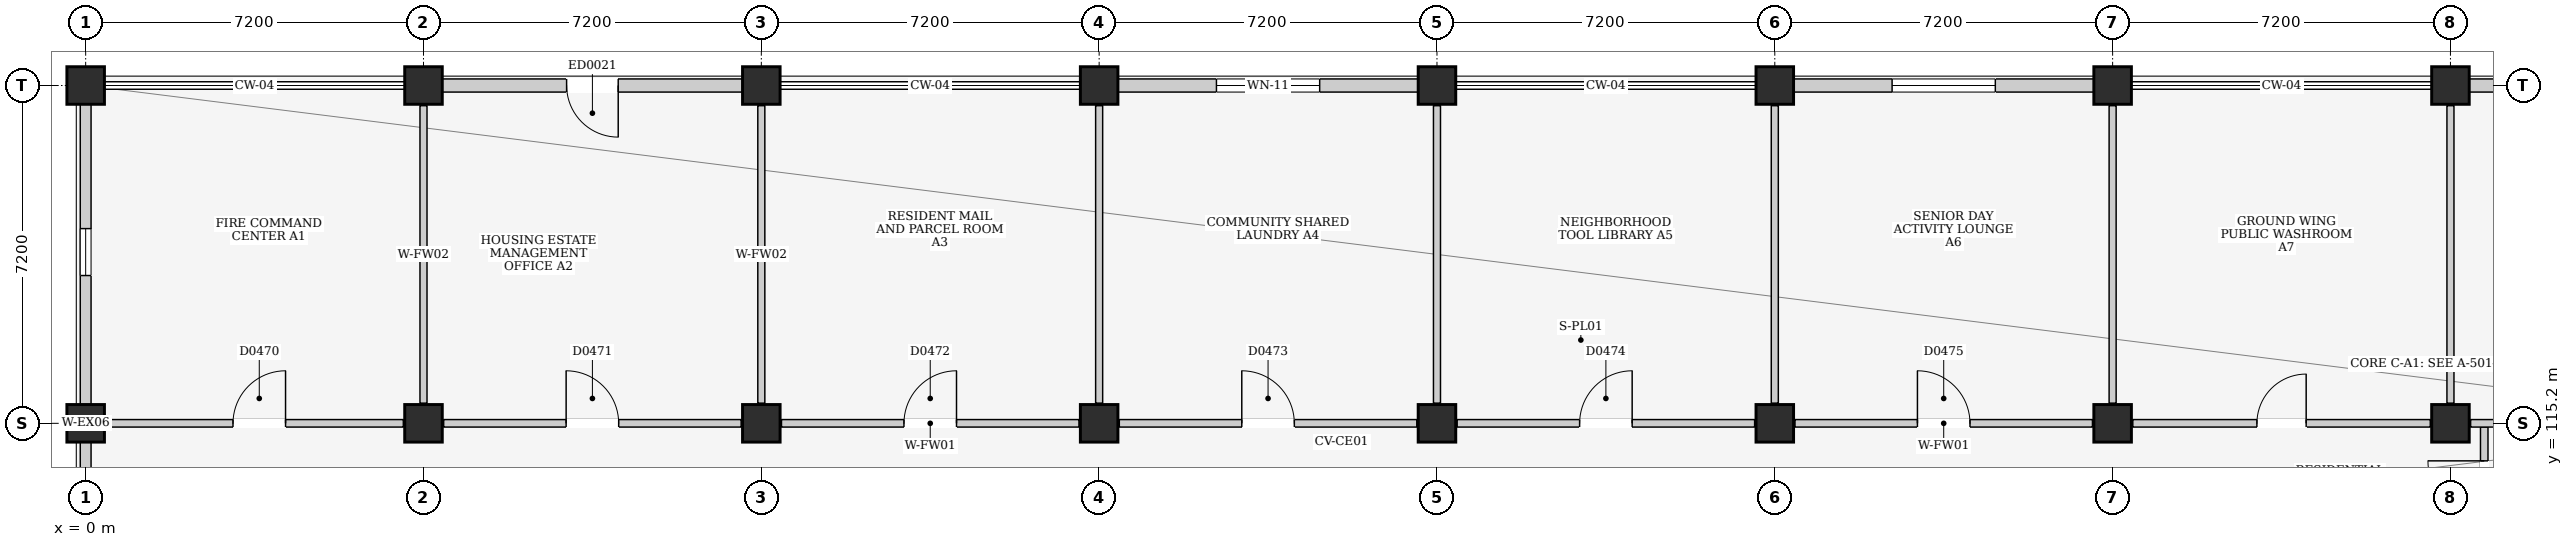
"""IFC4 building model, lengths in metres.
Left out: names, types, materials, properties, quantities, classifications, styles, units other than length and angle.
Written with IfcOpenShell. Run it as: python <this file> out.ifc"""

import sys

from ifc_helpers import new_model, si_unit, direction, frame, frame_2d, origin, origin_2d, place, context, subcontext, project, spatial, rectangle, extrude, element, fill, save


model = new_model("IFC4")
c1 = context("Model", 3, precision=1e-05, world=origin(), true_north=direction((0.0, 1.0)))
c2 = subcontext(c1, "Body", "Model", "MODEL_VIEW")
j1 = project(units=[si_unit("LENGTHUNIT", "METRE"), si_unit("PLANEANGLEUNIT", "RADIAN")], contexts=[c1])
p1 = place(None, origin())
s1 = spatial("IfcSite", under=j1, at=p1, CompositionType="ELEMENT")
p2 = place(p1, origin())
s2 = spatial("IfcBuilding", under=s1, at=p2, CompositionType="ELEMENT")
p3 = place(p2, origin())
s3 = spatial("IfcBuildingStorey", under=s2, at=p3, CompositionType="ELEMENT", Elevation=0.0)
for number, where, z_axis, x_axis in (
    (1, (0.0, 115.2, 0.0), (0.0, 0.0, 1.0), (1.0, 0.0, 0.0)),
    (2, (0.0, 122.4, 0.0), (0.0, 0.0, 1.0), (1.0, 0.0, 0.0)),
    (3, (7.2, 115.2, 0.0), (0.0, 0.0, 1.0), (1.0, 0.0, 0.0)),
    (4, (7.2, 122.4, 0.0), (0.0, 0.0, 1.0), (1.0, 0.0, 0.0)),
    (5, (14.4, 115.2, 0.0), (0.0, 0.0, 1.0), (1.0, 0.0, 0.0)),
    (6, (14.4, 122.4, 0.0), (0.0, 0.0, 1.0), (1.0, 0.0, 0.0)),
    (7, (21.6, 115.2, 0.0), (0.0, 0.0, 1.0), (1.0, 0.0, 0.0)),
    (8, (21.6, 122.4, 0.0), (0.0, 0.0, 1.0), (1.0, 0.0, 0.0)),
    (9, (28.8, 115.2, 0.0), (0.0, 0.0, 1.0), (1.0, 0.0, 0.0)),
    (10, (28.8, 122.4, 0.0), (0.0, 0.0, 1.0), (1.0, 0.0, 0.0)),
    (11, (36.0, 115.2, 0.0), (0.0, 0.0, 1.0), (1.0, 0.0, 0.0)),
    (12, (36.0, 122.4, 0.0), (0.0, 0.0, 1.0), (1.0, 0.0, 0.0)),
    (13, (43.2, 115.2, 0.0), (0.0, 0.0, 1.0), (1.0, 0.0, 0.0)),
    (14, (43.2, 122.4, 0.0), (0.0, 0.0, 1.0), (1.0, 0.0, 0.0)),
    (15, (50.4, 115.2, 0.0), (0.0, 0.0, 1.0), (1.0, 0.0, 0.0)),
    (16, (50.4, 122.4, 0.0), (0.0, 0.0, 1.0), (1.0, 0.0, 0.0)),
):
    element("IfcColumn", number, at=place(p3, frame(where, z_axis=z_axis, x_axis=x_axis)), inside=s3, PredefinedType="COLUMN", context=c2, shape_type="SweptSolid", body=[
        extrude(rectangle(XDim=0.8, YDim=0.8, at=origin_2d()), origin(), (0.0, 0.0, 1.0), 4.5),
    ])
p4 = place(p3, frame((7.6, 122.4, 0.0), z_axis=(0.0, 0.0, 1.0), x_axis=(1.0, 0.0, 0.0)))
e17 = element("IfcWall", 17, at=p4, inside=s3, PredefinedType="ELEMENTEDWALL", context=c2, shape_type="SweptSolid", body=[
    extrude(rectangle(XDim=6.4, YDim=0.28, at=frame_2d((3.2, 0.0))), origin(), (0.0, 0.0, 1.0), 3.665),
])
p5 = place(p4, frame((2.65, 0.0, 0.0)))
e18 = element("IfcOpeningElement", 18, at=p5, cuts=e17, PredefinedType="OPENING", context=c2, shape_type="SweptSolid", body=[
    extrude(rectangle(XDim=1.1, YDim=2.2, at=frame_2d((0.55, 1.1))), frame((0.0, 0.155, 0.0), z_axis=(0.0, -1.0, 0.0), x_axis=(1.0, 0.0, 0.0)), (0.0, 0.0, 1.0), 0.31),
])
p6 = place(p3, frame((22.0, 122.4, 0.0), z_axis=(0.0, 0.0, 1.0), x_axis=(1.0, 0.0, 0.0)))
e19 = element("IfcWall", 19, at=p6, inside=s3, PredefinedType="ELEMENTEDWALL", context=c2, shape_type="SweptSolid", body=[
    extrude(rectangle(XDim=6.4, YDim=0.28, at=frame_2d((3.2, 0.0))), origin(), (0.0, 0.0, 1.0), 3.665),
])
p7 = place(p6, frame((2.1, 0.0, 0.85)))
e20 = element("IfcOpeningElement", 20, at=p7, cuts=e19, PredefinedType="OPENING", context=c2, shape_type="SweptSolid", body=[
    extrude(rectangle(XDim=2.2, YDim=1.8, at=frame_2d((1.1, 0.9))), frame((0.0, 0.155, 0.0), z_axis=(0.0, -1.0, 0.0), x_axis=(1.0, 0.0, 0.0)), (0.0, 0.0, 1.0), 0.31),
])
p8 = place(p3, frame((36.4, 122.4, 0.0), z_axis=(0.0, 0.0, 1.0), x_axis=(1.0, 0.0, 0.0)))
e21 = element("IfcWall", 21, at=p8, inside=s3, PredefinedType="ELEMENTEDWALL", context=c2, shape_type="SweptSolid", body=[
    extrude(rectangle(XDim=6.4, YDim=0.28, at=frame_2d((3.2, 0.0))), origin(), (0.0, 0.0, 1.0), 3.665),
])
p9 = place(p8, frame((2.1, 0.0, 0.85)))
e22 = element("IfcOpeningElement", 22, at=p9, cuts=e21, PredefinedType="OPENING", context=c2, shape_type="SweptSolid", body=[
    extrude(rectangle(XDim=2.2, YDim=1.8, at=frame_2d((1.1, 0.9))), frame((0.0, 0.155, 0.0), z_axis=(0.0, -1.0, 0.0), x_axis=(1.0, 0.0, 0.0)), (0.0, 0.0, 1.0), 0.31),
])
p10 = place(p3, frame((50.8, 122.4, 0.0), z_axis=(0.0, 0.0, 1.0), x_axis=(1.0, 0.0, 0.0)))
e23 = element("IfcWall", 23, at=p10, inside=s3, PredefinedType="ELEMENTEDWALL", context=c2, shape_type="SweptSolid", body=[
    extrude(rectangle(XDim=6.4, YDim=0.28, at=frame_2d((3.2, 0.0))), origin(), (0.0, 0.0, 1.0), 3.665),
])
p11 = place(p10, frame((2.1, 0.0, 0.85)))
e24 = element("IfcOpeningElement", 24, at=p11, cuts=e23, PredefinedType="OPENING", context=c2, shape_type="SweptSolid", body=[
    extrude(rectangle(XDim=2.2, YDim=1.8, at=frame_2d((1.1, 0.9))), frame((0.0, 0.155, 0.0), z_axis=(0.0, -1.0, 0.0), x_axis=(1.0, 0.0, 0.0)), (0.0, 0.0, 1.0), 0.31),
])
p12 = place(p3, frame((0.0, 108.4, 0.0), z_axis=(0.0, 0.0, 1.0), x_axis=(0.0, 1.0, 0.0)))
e25 = element("IfcWall", 25, at=p12, inside=s3, PredefinedType="ELEMENTEDWALL", context=c2, shape_type="SweptSolid", body=[
    extrude(rectangle(XDim=6.4, YDim=0.23, at=frame_2d((3.2, 0.0))), origin(), (0.0, 0.0, 1.0), 3.665),
])
p13 = place(p12, frame((2.75, 0.0, 1.1)))
e26 = element("IfcOpeningElement", 26, at=p13, cuts=e25, PredefinedType="OPENING", context=c2, shape_type="SweptSolid", body=[
    extrude(rectangle(XDim=1.0, YDim=0.9, at=frame_2d((0.5, 0.45))), frame((0.0, 0.13, 0.0), z_axis=(0.0, -1.0, 0.0), x_axis=(1.0, 0.0, 0.0)), (0.0, 0.0, 1.0), 0.26),
])
p14 = place(p3, frame((0.0, 115.6, 0.0), z_axis=(0.0, 0.0, 1.0), x_axis=(0.0, 1.0, 0.0)))
e27 = element("IfcWall", 27, at=p14, inside=s3, PredefinedType="ELEMENTEDWALL", context=c2, shape_type="SweptSolid", body=[
    extrude(rectangle(XDim=6.4, YDim=0.23, at=frame_2d((3.2, 0.0))), origin(), (0.0, 0.0, 1.0), 3.665),
])
p15 = place(p14, frame((2.75, 0.0, 1.1)))
e28 = element("IfcOpeningElement", 28, at=p15, cuts=e27, PredefinedType="OPENING", context=c2, shape_type="SweptSolid", body=[
    extrude(rectangle(XDim=1.0, YDim=0.9, at=frame_2d((0.5, 0.45))), frame((0.0, 0.13, 0.0), z_axis=(0.0, -1.0, 0.0), x_axis=(1.0, 0.0, 0.0)), (0.0, 0.0, 1.0), 0.26),
])
p16 = place(p3, frame((51.12, 111.1, 0.0), z_axis=(0.0, 0.0, 1.0), x_axis=(0.0, 1.0, 0.0)))
e29 = element("IfcWall", 29, at=p16, inside=s3, PredefinedType="PARTITIONING", context=c2, shape_type="SweptSolid", body=[
    extrude(rectangle(XDim=4.02, YDim=0.16, at=frame_2d((2.01, 0.0))), origin(), (0.0, 0.0, 1.0), 4.2),
])
p17 = place(p16, frame((2.1, 0.0, 0.0)))
e30 = element("IfcOpeningElement", 30, at=p17, cuts=e29, PredefinedType="OPENING", context=c2, shape_type="SweptSolid", body=[
    extrude(rectangle(XDim=1.2, YDim=2.2, at=frame_2d((0.6, 1.1))), frame((0.0, 0.095, 0.0), z_axis=(0.0, -1.0, 0.0), x_axis=(1.0, 0.0, 0.0)), (0.0, 0.0, 1.0), 0.19),
])
p18 = place(p3, frame((0.43, 115.2, 0.0), z_axis=(0.0, 0.0, 1.0), x_axis=(1.0, 0.0, 0.0)))
e31 = element("IfcWall", 31, at=p18, inside=s3, PredefinedType="PARTITIONING", context=c2, shape_type="SweptSolid", body=[
    extrude(rectangle(XDim=6.34, YDim=0.16, at=frame_2d((3.17, 0.0))), origin(), (0.0, 0.0, 1.0), 3.435),
])
p19 = place(p18, frame((2.71, 0.0, 0.0)))
e32 = element("IfcOpeningElement", 32, at=p19, cuts=e31, PredefinedType="OPENING", context=c2, shape_type="SweptSolid", body=[
    extrude(rectangle(XDim=1.12, YDim=2.2, at=frame_2d((0.56, 1.1))), frame((0.0, 0.095, 0.0), z_axis=(0.0, -1.0, 0.0), x_axis=(1.0, 0.0, 0.0)), (0.0, 0.0, 1.0), 0.19),
])
p20 = place(p3, frame((7.2, 115.63, 0.0), z_axis=(0.0, 0.0, 1.0), x_axis=(0.0, 1.0, 0.0)))
e33 = element("IfcWall", 33, at=p20, inside=s3, PredefinedType="PARTITIONING", context=c2, shape_type="SweptSolid", body=[
    extrude(rectangle(XDim=6.34, YDim=0.15, at=frame_2d((3.17, 0.0))), origin(), (0.0, 0.0, 1.0), 3.435),
])
p21 = place(p3, frame((7.63, 115.2, 0.0), z_axis=(0.0, 0.0, 1.0), x_axis=(1.0, 0.0, 0.0)))
e34 = element("IfcWall", 34, at=p21, inside=s3, PredefinedType="PARTITIONING", context=c2, shape_type="SweptSolid", body=[
    extrude(rectangle(XDim=6.34, YDim=0.16, at=frame_2d((3.17, 0.0))), origin(), (0.0, 0.0, 1.0), 3.435),
])
p22 = place(p21, frame((2.61, 0.0, 0.0)))
e35 = element("IfcOpeningElement", 35, at=p22, cuts=e34, PredefinedType="OPENING", context=c2, shape_type="SweptSolid", body=[
    extrude(rectangle(XDim=1.12, YDim=2.2, at=frame_2d((0.56, 1.1))), frame((0.0, 0.095, 0.0), z_axis=(0.0, -1.0, 0.0), x_axis=(1.0, 0.0, 0.0)), (0.0, 0.0, 1.0), 0.19),
])
p23 = place(p3, frame((14.4, 115.63, 0.0), z_axis=(0.0, 0.0, 1.0), x_axis=(0.0, 1.0, 0.0)))
e36 = element("IfcWall", 36, at=p23, inside=s3, PredefinedType="PARTITIONING", context=c2, shape_type="SweptSolid", body=[
    extrude(rectangle(XDim=6.34, YDim=0.15, at=frame_2d((3.17, 0.0))), origin(), (0.0, 0.0, 1.0), 3.435),
])
p24 = place(p3, frame((14.83, 115.2, 0.0), z_axis=(0.0, 0.0, 1.0), x_axis=(1.0, 0.0, 0.0)))
e37 = element("IfcWall", 37, at=p24, inside=s3, PredefinedType="PARTITIONING", context=c2, shape_type="SweptSolid", body=[
    extrude(rectangle(XDim=6.34, YDim=0.16, at=frame_2d((3.17, 0.0))), origin(), (0.0, 0.0, 1.0), 3.435),
])
p25 = place(p24, frame((2.61, 0.0, 0.0)))
e38 = element("IfcOpeningElement", 38, at=p25, cuts=e37, PredefinedType="OPENING", context=c2, shape_type="SweptSolid", body=[
    extrude(rectangle(XDim=1.12, YDim=2.2, at=frame_2d((0.56, 1.1))), frame((0.0, 0.095, 0.0), z_axis=(0.0, -1.0, 0.0), x_axis=(1.0, 0.0, 0.0)), (0.0, 0.0, 1.0), 0.19),
])
p26 = place(p3, frame((21.6, 115.63, 0.0), z_axis=(0.0, 0.0, 1.0), x_axis=(0.0, 1.0, 0.0)))
e39 = element("IfcWall", 39, at=p26, inside=s3, PredefinedType="PARTITIONING", context=c2, shape_type="SweptSolid", body=[
    extrude(rectangle(XDim=6.34, YDim=0.15, at=frame_2d((3.17, 0.0))), origin(), (0.0, 0.0, 1.0), 3.435),
])
p27 = place(p3, frame((22.03, 115.2, 0.0), z_axis=(0.0, 0.0, 1.0), x_axis=(1.0, 0.0, 0.0)))
e40 = element("IfcWall", 40, at=p27, inside=s3, PredefinedType="PARTITIONING", context=c2, shape_type="SweptSolid", body=[
    extrude(rectangle(XDim=6.34, YDim=0.16, at=frame_2d((3.17, 0.0))), origin(), (0.0, 0.0, 1.0), 3.435),
])
p28 = place(p27, frame((2.61, 0.0, 0.0)))
e41 = element("IfcOpeningElement", 41, at=p28, cuts=e40, PredefinedType="OPENING", context=c2, shape_type="SweptSolid", body=[
    extrude(rectangle(XDim=1.12, YDim=2.2, at=frame_2d((0.56, 1.1))), frame((0.0, 0.095, 0.0), z_axis=(0.0, -1.0, 0.0), x_axis=(1.0, 0.0, 0.0)), (0.0, 0.0, 1.0), 0.19),
])
p29 = place(p3, frame((28.8, 115.63, 0.0), z_axis=(0.0, 0.0, 1.0), x_axis=(0.0, 1.0, 0.0)))
e42 = element("IfcWall", 42, at=p29, inside=s3, PredefinedType="PARTITIONING", context=c2, shape_type="SweptSolid", body=[
    extrude(rectangle(XDim=6.34, YDim=0.15, at=frame_2d((3.17, 0.0))), origin(), (0.0, 0.0, 1.0), 3.435),
])
p30 = place(p3, frame((29.23, 115.2, 0.0), z_axis=(0.0, 0.0, 1.0), x_axis=(1.0, 0.0, 0.0)))
e43 = element("IfcWall", 43, at=p30, inside=s3, PredefinedType="PARTITIONING", context=c2, shape_type="SweptSolid", body=[
    extrude(rectangle(XDim=6.34, YDim=0.16, at=frame_2d((3.17, 0.0))), origin(), (0.0, 0.0, 1.0), 3.435),
])
p31 = place(p30, frame((2.61, 0.0, 0.0)))
e44 = element("IfcOpeningElement", 44, at=p31, cuts=e43, PredefinedType="OPENING", context=c2, shape_type="SweptSolid", body=[
    extrude(rectangle(XDim=1.12, YDim=2.2, at=frame_2d((0.56, 1.1))), frame((0.0, 0.095, 0.0), z_axis=(0.0, -1.0, 0.0), x_axis=(1.0, 0.0, 0.0)), (0.0, 0.0, 1.0), 0.19),
])
p32 = place(p3, frame((36.0, 115.63, 0.0), z_axis=(0.0, 0.0, 1.0), x_axis=(0.0, 1.0, 0.0)))
e45 = element("IfcWall", 45, at=p32, inside=s3, PredefinedType="PARTITIONING", context=c2, shape_type="SweptSolid", body=[
    extrude(rectangle(XDim=6.34, YDim=0.15, at=frame_2d((3.17, 0.0))), origin(), (0.0, 0.0, 1.0), 3.435),
])
p33 = place(p3, frame((36.43, 115.2, 0.0), z_axis=(0.0, 0.0, 1.0), x_axis=(1.0, 0.0, 0.0)))
e46 = element("IfcWall", 46, at=p33, inside=s3, PredefinedType="PARTITIONING", context=c2, shape_type="SweptSolid", body=[
    extrude(rectangle(XDim=6.34, YDim=0.16, at=frame_2d((3.17, 0.0))), origin(), (0.0, 0.0, 1.0), 3.435),
])
p34 = place(p33, frame((2.61, 0.0, 0.0)))
e47 = element("IfcOpeningElement", 47, at=p34, cuts=e46, PredefinedType="OPENING", context=c2, shape_type="SweptSolid", body=[
    extrude(rectangle(XDim=1.12, YDim=2.2, at=frame_2d((0.56, 1.1))), frame((0.0, 0.095, 0.0), z_axis=(0.0, -1.0, 0.0), x_axis=(1.0, 0.0, 0.0)), (0.0, 0.0, 1.0), 0.19),
])
p35 = place(p3, frame((43.2, 115.63, 0.0), z_axis=(0.0, 0.0, 1.0), x_axis=(0.0, 1.0, 0.0)))
e48 = element("IfcWall", 48, at=p35, inside=s3, PredefinedType="PARTITIONING", context=c2, shape_type="SweptSolid", body=[
    extrude(rectangle(XDim=6.34, YDim=0.15, at=frame_2d((3.17, 0.0))), origin(), (0.0, 0.0, 1.0), 3.435),
])
p36 = place(p3, frame((43.63, 115.2, 0.0), z_axis=(0.0, 0.0, 1.0), x_axis=(1.0, 0.0, 0.0)))
e49 = element("IfcWall", 49, at=p36, inside=s3, PredefinedType="PARTITIONING", context=c2, shape_type="SweptSolid", body=[
    extrude(rectangle(XDim=6.34, YDim=0.16, at=frame_2d((3.17, 0.0))), origin(), (0.0, 0.0, 1.0), 3.435),
])
p37 = place(p36, frame((2.645, 0.0, 0.0)))
e50 = element("IfcOpeningElement", 50, at=p37, cuts=e49, PredefinedType="OPENING", context=c2, shape_type="SweptSolid", body=[
    extrude(rectangle(XDim=1.05, YDim=2.15, at=frame_2d((0.525, 1.075))), frame((0.0, 0.095, 0.0), z_axis=(0.0, -1.0, 0.0), x_axis=(1.0, 0.0, 0.0)), (0.0, 0.0, 1.0), 0.19),
])
p38 = place(p3, frame((50.4, 115.63, 0.0), z_axis=(0.0, 0.0, 1.0), x_axis=(0.0, 1.0, 0.0)))
e51 = element("IfcWall", 51, at=p38, inside=s3, PredefinedType="PARTITIONING", context=c2, shape_type="SweptSolid", body=[
    extrude(rectangle(XDim=6.34, YDim=0.15, at=frame_2d((3.17, 0.0))), origin(), (0.0, 0.0, 1.0), 3.435),
])
p39 = place(p3, frame((50.83, 115.2, 0.0), z_axis=(0.0, 0.0, 1.0), x_axis=(1.0, 0.0, 0.0)))
e52 = element("IfcWall", 52, at=p39, inside=s3, PredefinedType="PARTITIONING", context=c2, shape_type="SweptSolid", body=[
    extrude(rectangle(XDim=6.34, YDim=0.16, at=frame_2d((3.17, 0.0))), origin(), (0.0, 0.0, 1.0), 3.435),
])
p40 = place(p39, frame((2.645, 0.0, 0.0)))
e53 = element("IfcOpeningElement", 53, at=p40, cuts=e52, PredefinedType="OPENING", context=c2, shape_type="SweptSolid", body=[
    extrude(rectangle(XDim=1.05, YDim=2.15, at=frame_2d((0.525, 1.075))), frame((0.0, 0.095, 0.0), z_axis=(0.0, -1.0, 0.0), x_axis=(1.0, 0.0, 0.0)), (0.0, 0.0, 1.0), 0.19),
])
p41 = place(p5, frame((1.1, 0.0, 0.0), z_axis=(0.0, 0.0, 1.0), x_axis=(-1.0, 0.0, 0.0)))
e54 = element("IfcDoor", 54, at=p41, inside=s3, OperationType="SINGLE_SWING_LEFT", PredefinedType="DOOR", context=c2, shape_type="SweptSolid", body=[
    extrude(rectangle(XDim=1.1, YDim=2.2, at=frame_2d((0.55, 1.1))), frame((0.0, 0.025, 0.0), z_axis=(0.0, -1.0, 0.0), x_axis=(1.0, 0.0, 0.0)), (0.0, 0.0, 1.0), 0.05),
])
fill(e18, e54)
p42 = place(p7, origin())
e55 = element("IfcWindow", 55, at=p42, inside=s3, PartitioningType="TRIPLE_PANEL_VERTICAL", PredefinedType="WINDOW", context=c2, shape_type="SweptSolid", body=[
    extrude(rectangle(XDim=2.2, YDim=1.8, at=frame_2d((1.1, 0.9))), frame((0.0, 0.03, 0.0), z_axis=(0.0, -1.0, 0.0), x_axis=(1.0, 0.0, 0.0)), (0.0, 0.0, 1.0), 0.06),
])
fill(e20, e55)
p43 = place(p9, origin())
e56 = element("IfcWindow", 56, at=p43, inside=s3, PartitioningType="TRIPLE_PANEL_VERTICAL", PredefinedType="WINDOW", context=c2, shape_type="SweptSolid", body=[
    extrude(rectangle(XDim=2.2, YDim=1.8, at=frame_2d((1.1, 0.9))), frame((0.0, 0.03, 0.0), z_axis=(0.0, -1.0, 0.0), x_axis=(1.0, 0.0, 0.0)), (0.0, 0.0, 1.0), 0.06),
])
fill(e22, e56)
p44 = place(p15, origin())
e57 = element("IfcWindow", 57, at=p44, inside=s3, PartitioningType="SINGLE_PANEL", PredefinedType="WINDOW", context=c2, shape_type="SweptSolid", body=[
    extrude(rectangle(XDim=1.0, YDim=0.9, at=frame_2d((0.5, 0.45))), frame((0.0, 0.03, 0.0), z_axis=(0.0, -1.0, 0.0), x_axis=(1.0, 0.0, 0.0)), (0.0, 0.0, 1.0), 0.06),
])
fill(e28, e57)
p45 = place(p17, origin())
e58 = element("IfcDoor", 58, at=p45, inside=s3, OperationType="SINGLE_SWING_RIGHT", PredefinedType="DOOR", context=c2, shape_type="SweptSolid", body=[
    extrude(rectangle(XDim=1.2, YDim=2.2, at=frame_2d((0.6, 1.1))), frame((0.0, 0.025, 0.0), z_axis=(0.0, -1.0, 0.0), x_axis=(1.0, 0.0, 0.0)), (0.0, 0.0, 1.0), 0.05),
])
fill(e30, e58)
p46 = place(p19, origin())
e59 = element("IfcDoor", 59, at=p46, inside=s3, OperationType="SINGLE_SWING_RIGHT", PredefinedType="DOOR", context=c2, shape_type="SweptSolid", body=[
    extrude(rectangle(XDim=1.12, YDim=2.2, at=frame_2d((0.56, 1.1))), frame((0.0, 0.025, 0.0), z_axis=(0.0, -1.0, 0.0), x_axis=(1.0, 0.0, 0.0)), (0.0, 0.0, 1.0), 0.05),
])
fill(e32, e59)
p47 = place(p22, origin())
e60 = element("IfcDoor", 60, at=p47, inside=s3, OperationType="SINGLE_SWING_LEFT", PredefinedType="DOOR", context=c2, shape_type="SweptSolid", body=[
    extrude(rectangle(XDim=1.12, YDim=2.2, at=frame_2d((0.56, 1.1))), frame((0.0, 0.025, 0.0), z_axis=(0.0, -1.0, 0.0), x_axis=(1.0, 0.0, 0.0)), (0.0, 0.0, 1.0), 0.05),
])
fill(e35, e60)
p48 = place(p25, origin())
e61 = element("IfcDoor", 61, at=p48, inside=s3, OperationType="SINGLE_SWING_RIGHT", PredefinedType="DOOR", context=c2, shape_type="SweptSolid", body=[
    extrude(rectangle(XDim=1.12, YDim=2.2, at=frame_2d((0.56, 1.1))), frame((0.0, 0.025, 0.0), z_axis=(0.0, -1.0, 0.0), x_axis=(1.0, 0.0, 0.0)), (0.0, 0.0, 1.0), 0.05),
])
fill(e38, e61)
p49 = place(p28, origin())
e62 = element("IfcDoor", 62, at=p49, inside=s3, OperationType="SINGLE_SWING_LEFT", PredefinedType="DOOR", context=c2, shape_type="SweptSolid", body=[
    extrude(rectangle(XDim=1.12, YDim=2.2, at=frame_2d((0.56, 1.1))), frame((0.0, 0.025, 0.0), z_axis=(0.0, -1.0, 0.0), x_axis=(1.0, 0.0, 0.0)), (0.0, 0.0, 1.0), 0.05),
])
fill(e41, e62)
p50 = place(p31, origin())
e63 = element("IfcDoor", 63, at=p50, inside=s3, OperationType="SINGLE_SWING_RIGHT", PredefinedType="DOOR", context=c2, shape_type="SweptSolid", body=[
    extrude(rectangle(XDim=1.12, YDim=2.2, at=frame_2d((0.56, 1.1))), frame((0.0, 0.025, 0.0), z_axis=(0.0, -1.0, 0.0), x_axis=(1.0, 0.0, 0.0)), (0.0, 0.0, 1.0), 0.05),
])
fill(e44, e63)
p51 = place(p34, origin())
e64 = element("IfcDoor", 64, at=p51, inside=s3, OperationType="SINGLE_SWING_LEFT", PredefinedType="DOOR", context=c2, shape_type="SweptSolid", body=[
    extrude(rectangle(XDim=1.12, YDim=2.2, at=frame_2d((0.56, 1.1))), frame((0.0, 0.025, 0.0), z_axis=(0.0, -1.0, 0.0), x_axis=(1.0, 0.0, 0.0)), (0.0, 0.0, 1.0), 0.05),
])
fill(e47, e64)
p52 = place(p37, origin())
e65 = element("IfcDoor", 65, at=p52, inside=s3, OperationType="SINGLE_SWING_RIGHT", PredefinedType="DOOR", context=c2, shape_type="SweptSolid", body=[
    extrude(rectangle(XDim=1.05, YDim=2.15, at=frame_2d((0.525, 1.075))), frame((0.0, 0.025, 0.0), z_axis=(0.0, -1.0, 0.0), x_axis=(1.0, 0.0, 0.0)), (0.0, 0.0, 1.0), 0.05),
])
fill(e50, e65)
save(model, sys.argv[1])
